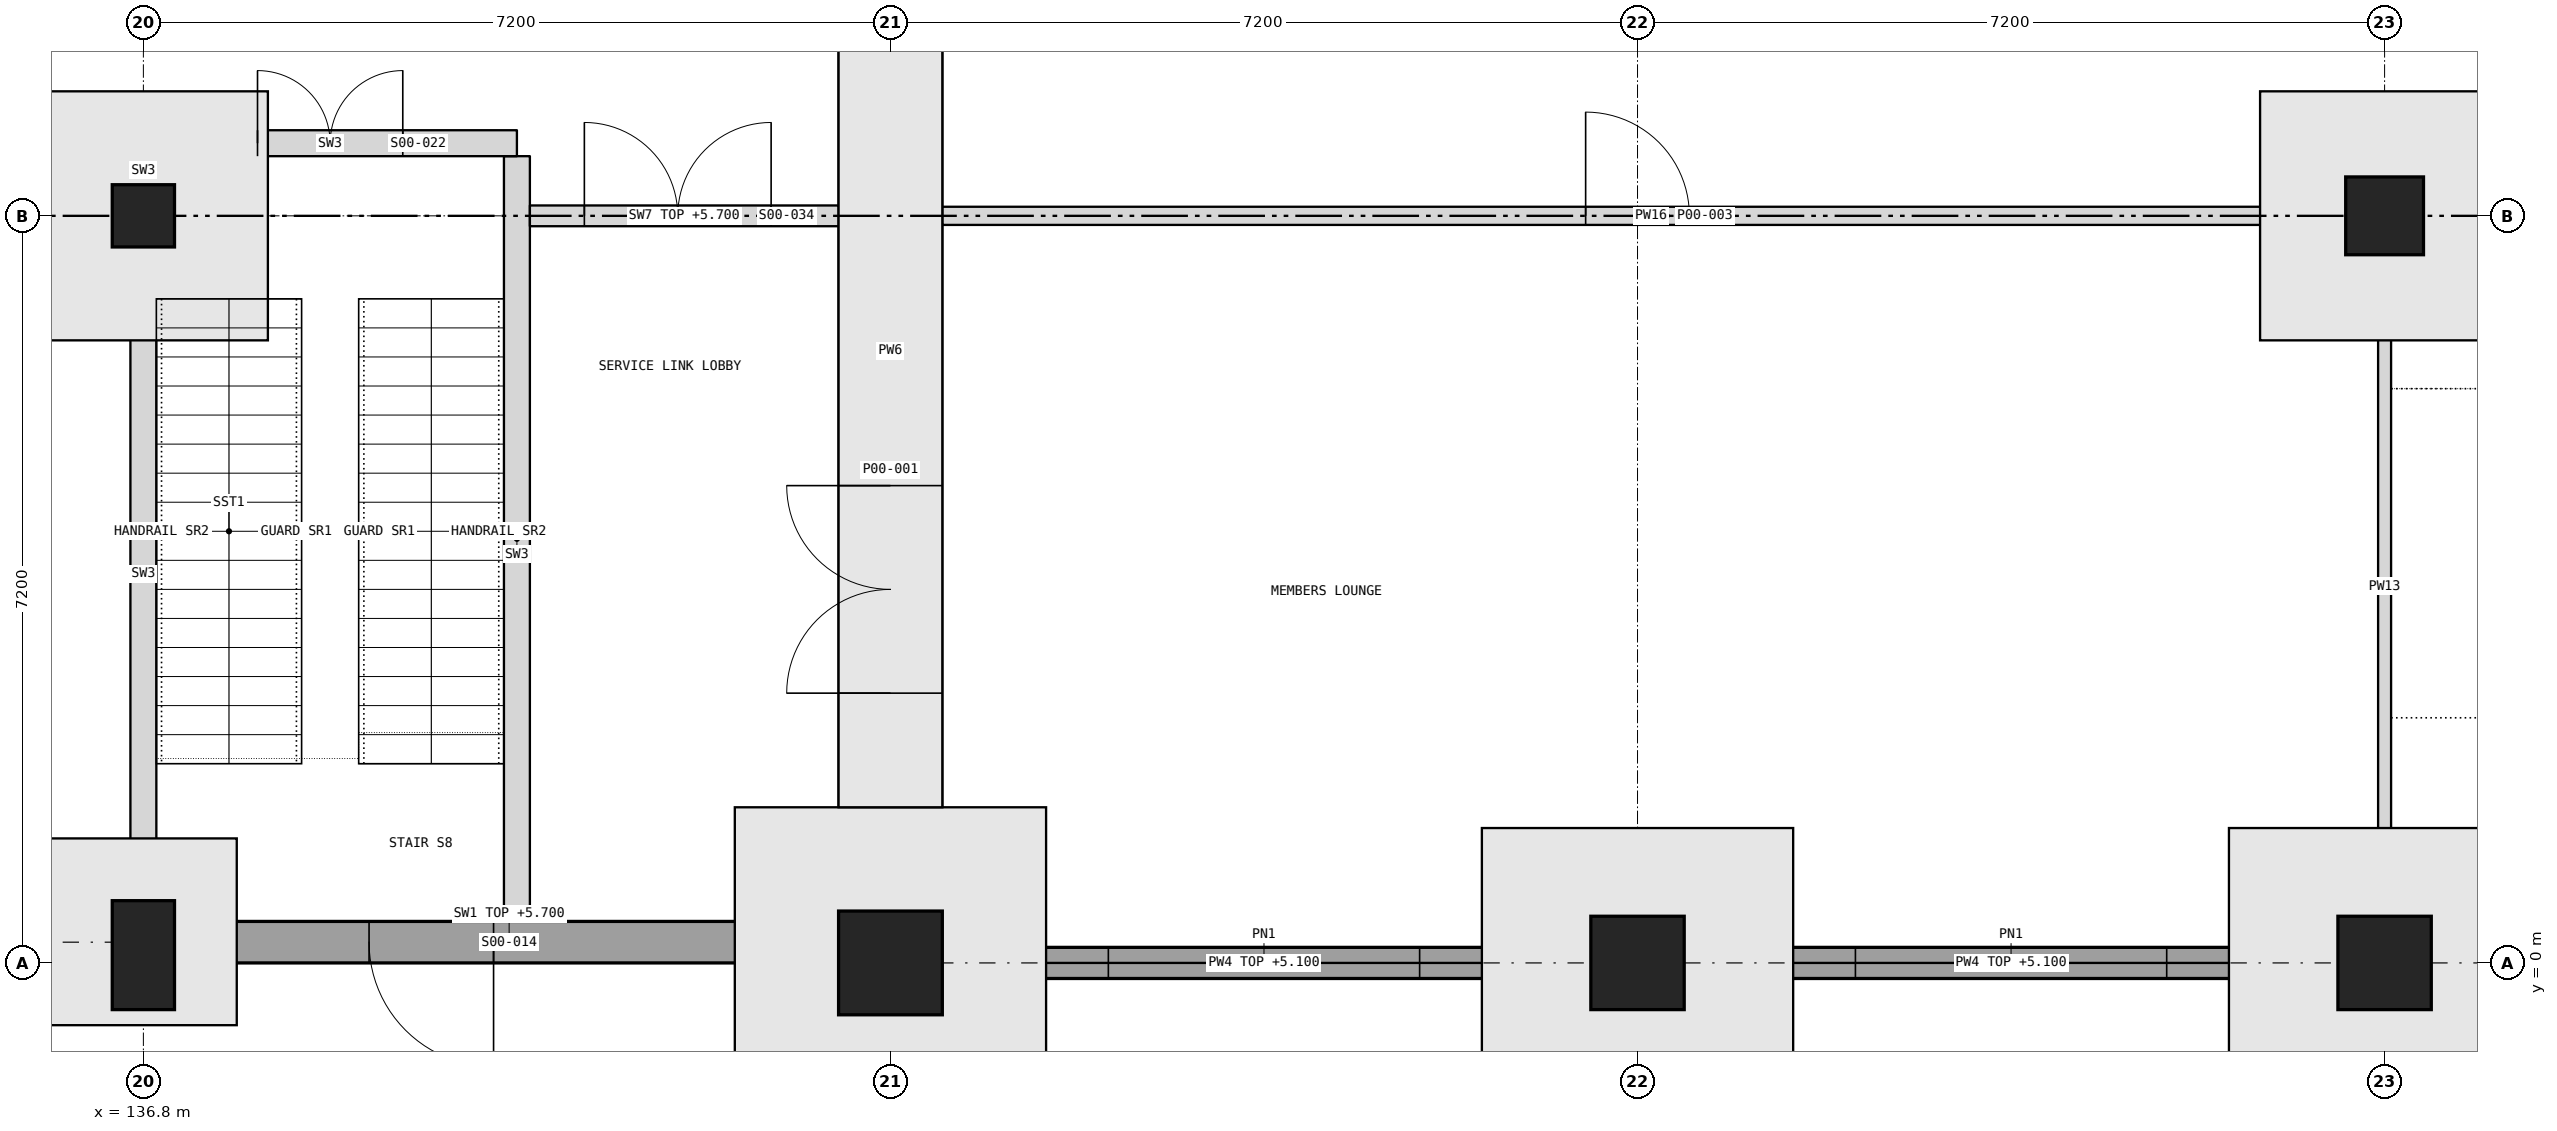
"""IFC4 building model, lengths in metres.
Left out: names, types, materials, properties, quantities, classifications, styles, units other than length and angle.
Written with IfcOpenShell. Run it as: python <this file> out.ifc"""

import sys

from ifc_helpers import new_model, si_unit, direction, frame, frame_2d, origin, origin_2d, place, context, subcontext, project, spatial, rectangle, extrude, element, fill, save


model = new_model("IFC4")
c1 = context("Model", 3, precision=1e-05, world=origin(), true_north=direction((0.0, 1.0)))
c2 = subcontext(c1, "Body", "Model", "MODEL_VIEW")
j1 = project(units=[si_unit("LENGTHUNIT", "METRE"), si_unit("PLANEANGLEUNIT", "RADIAN")], contexts=[c1])
p1 = place(None, origin())
s1 = spatial("IfcSite", under=j1, at=p1, CompositionType="ELEMENT")
p2 = place(p1, origin())
s2 = spatial("IfcBuilding", under=s1, at=p2, CompositionType="ELEMENT")
p3 = place(p2, origin())
s3 = spatial("IfcBuildingStorey", under=s2, at=p3, CompositionType="ELEMENT", Elevation=0.0)
p4 = place(p3, frame((136.8, 0.075, -0.45), z_axis=(0.0, 0.0, 1.0), x_axis=(1.0, 0.0, 0.0)))
e1 = element("IfcColumn", 1, at=p4, inside=s3, PredefinedType="COLUMN", context=c2, shape_type="SweptSolid", body=[
    extrude(rectangle(XDim=0.6, YDim=1.05, at=origin_2d()), origin(), (0.0, 0.0, 1.0), 6.45),
])
p5 = place(p3, frame((136.8, 7.2, -0.405), z_axis=(0.0, 0.0, 1.0), x_axis=(1.0, 0.0, 0.0)))
e2 = element("IfcColumn", 2, at=p5, inside=s3, PredefinedType="COLUMN", context=c2, shape_type="SweptSolid", body=[
    extrude(rectangle(XDim=0.6, YDim=0.6, at=origin_2d()), origin(), (0.0, 0.0, 1.0), 6.405),
])
p6 = place(p3, frame((129.9, 0.2, 0.0), z_axis=(0.0, 0.0, 1.0), x_axis=(1.0, 0.0, 0.0)))
e3 = element("IfcWall", 3, at=p6, inside=s3, PredefinedType="SOLIDWALL", context=c2, shape_type="SweptSolid", body=[
    extrude(rectangle(XDim=6.6, YDim=0.4, at=frame_2d((3.3, 0.0))), origin(), (0.0, 0.0, 1.0), 5.1),
])
p7 = place(p3, frame((137.1, 0.2, 0.0), z_axis=(0.0, 0.0, 1.0), x_axis=(1.0, 0.0, 0.0)))
e4 = element("IfcWall", 4, at=p7, inside=s3, PredefinedType="SOLIDWALL", context=c2, shape_type="SweptSolid", body=[
    extrude(rectangle(XDim=6.45, YDim=0.4, at=frame_2d((3.225, 0.0))), origin(), (0.0, 0.0, 1.0), 5.7),
])
p8 = place(p7, frame((1.875, 0.0, 0.0)))
e5 = element("IfcOpeningElement", 5, at=p8, cuts=e4, PredefinedType="OPENING", context=c2, shape_type="SweptSolid", body=[
    extrude(rectangle(XDim=1.2, YDim=2.1, at=frame_2d((0.6, 1.05))), frame((0.0, 0.21, 0.0), z_axis=(0.0, -1.0, 0.0), x_axis=(1.0, 0.0, 0.0)), (0.0, 0.0, 1.0), 0.42),
])
p9 = place(p3, frame((144.0, 0.0, -0.5), z_axis=(0.0, 0.0, 1.0), x_axis=(1.0, 0.0, 0.0)))
e6 = element("IfcColumn", 6, at=p9, inside=s3, PredefinedType="COLUMN", context=c2, shape_type="SweptSolid", body=[
    extrude(rectangle(XDim=1.0, YDim=1.0, at=origin_2d()), origin(), (0.0, 0.0, 1.0), 6.5),
])
for number, where, z_axis, x_axis in (
    (7, (151.2, 0.0, 0.0), (0.0, 0.0, 1.0), (1.0, 0.0, 0.0)),
    (8, (158.4, 0.0, 0.0), (0.0, 0.0, 1.0), (1.0, 0.0, 0.0)),
):
    element("IfcColumn", number, at=place(p3, frame(where, z_axis=z_axis, x_axis=x_axis)), inside=s3, PredefinedType="COLUMN", context=c2, shape_type="SweptSolid", body=[
        extrude(rectangle(XDim=0.9, YDim=0.9, at=origin_2d()), origin(), (0.0, 0.0, 1.0), 6.0),
    ])
p10 = place(p3, frame((158.4, 7.2, 0.0), z_axis=(0.0, 0.0, 1.0), x_axis=(1.0, 0.0, 0.0)))
e9 = element("IfcColumn", 9, at=p10, inside=s3, PredefinedType="COLUMN", context=c2, shape_type="SweptSolid", body=[
    extrude(rectangle(XDim=0.75, YDim=0.75, at=origin_2d()), origin(), (0.0, 0.0, 1.0), 6.0),
])
p11 = place(p3, frame((144.0, 0.4, 0.0), z_axis=(0.0, 0.0, 1.0), x_axis=(0.0, 1.0, 0.0)))
e10 = element("IfcWall", 10, at=p11, inside=s3, PredefinedType="SOLIDWALL", context=c2, shape_type="SweptSolid", body=[
    extrude(rectangle(XDim=11.0, YDim=1.0, at=frame_2d((5.5, 0.0))), origin(), (0.0, 0.0, 1.0), 5.5),
])
p12 = place(p11, frame((2.2, 0.0, 0.0)))
e11 = element("IfcOpeningElement", 11, at=p12, cuts=e10, PredefinedType="OPENING", context=c2, shape_type="SweptSolid", body=[
    extrude(rectangle(XDim=2.0, YDim=2.1, at=frame_2d((1.0, 1.05))), frame((0.0, 0.51, 0.0), z_axis=(0.0, -1.0, 0.0), x_axis=(1.0, 0.0, 0.0)), (0.0, 0.0, 1.0), 1.02),
])
p13 = place(p3, frame((144.45, 0.0, 0.0), z_axis=(0.0, 0.0, 1.0), x_axis=(1.0, 0.0, 0.0)))
e12 = element("IfcWall", 12, at=p13, inside=s3, PredefinedType="SOLIDWALL", context=c2, shape_type="SweptSolid", body=[
    extrude(rectangle(XDim=6.3, YDim=0.3, at=frame_2d((3.15, 0.0))), origin(), (0.0, 0.0, 1.0), 5.1),
])
p14 = place(p13, frame((1.65, 0.0, 1.2)))
e13 = element("IfcOpeningElement", 13, at=p14, cuts=e12, PredefinedType="OPENING", context=c2, shape_type="SweptSolid", body=[
    extrude(rectangle(XDim=3.0, YDim=2.4, at=frame_2d((1.5, 1.2))), frame((0.0, 0.16, 0.0), z_axis=(0.0, -1.0, 0.0), x_axis=(1.0, 0.0, 0.0)), (0.0, 0.0, 1.0), 0.32),
])
p15 = place(p3, frame((151.65, 0.0, 0.0), z_axis=(0.0, 0.0, 1.0), x_axis=(1.0, 0.0, 0.0)))
e14 = element("IfcWall", 14, at=p15, inside=s3, PredefinedType="SOLIDWALL", context=c2, shape_type="SweptSolid", body=[
    extrude(rectangle(XDim=6.3, YDim=0.3, at=frame_2d((3.15, 0.0))), origin(), (0.0, 0.0, 1.0), 5.1),
])
p16 = place(p15, frame((1.65, 0.0, 1.2)))
e15 = element("IfcOpeningElement", 15, at=p16, cuts=e14, PredefinedType="OPENING", context=c2, shape_type="SweptSolid", body=[
    extrude(rectangle(XDim=3.0, YDim=2.4, at=frame_2d((1.5, 1.2))), frame((0.0, 0.16, 0.0), z_axis=(0.0, -1.0, 0.0), x_axis=(1.0, 0.0, 0.0)), (0.0, 0.0, 1.0), 0.32),
])
p17 = place(p3, frame((158.85, 0.0, 0.0), z_axis=(0.0, 0.0, 1.0), x_axis=(1.0, 0.0, 0.0)))
e16 = element("IfcWall", 16, at=p17, inside=s3, PredefinedType="SOLIDWALL", context=c2, shape_type="SweptSolid", body=[
    extrude(rectangle(XDim=6.3, YDim=0.3, at=frame_2d((3.15, 0.0))), origin(), (0.0, 0.0, 1.0), 5.1),
])
p18 = place(p17, frame((2.25, 0.0, 0.0)))
e17 = element("IfcOpeningElement", 17, at=p18, cuts=e16, PredefinedType="OPENING", context=c2, shape_type="SweptSolid", body=[
    extrude(rectangle(XDim=1.8, YDim=2.1, at=frame_2d((0.9, 1.05))), frame((0.0, 0.16, 0.0), z_axis=(0.0, -1.0, 0.0), x_axis=(1.0, 0.0, 0.0)), (0.0, 0.0, 1.0), 0.32),
])
p19 = place(p3, frame((136.8, 0.6, 0.0), z_axis=(0.0, 0.0, 1.0), x_axis=(0.0, 1.0, 0.0)))
e18 = element("IfcWall", 18, at=p19, inside=s3, PredefinedType="SOLIDWALL", context=c2, shape_type="SweptSolid", body=[
    extrude(rectangle(XDim=6.3, YDim=0.25, at=frame_2d((3.15, 0.0))), origin(), (0.0, 0.0, 1.0), 5.7),
])
p20 = place(p3, frame((136.8, 7.5, 0.0), z_axis=(0.0, 0.0, 1.0), x_axis=(0.0, 1.0, 0.0)))
e19 = element("IfcWall", 19, at=p20, inside=s3, PredefinedType="SOLIDWALL", context=c2, shape_type="SweptSolid", body=[
    extrude(rectangle(XDim=0.275, YDim=0.25, at=frame_2d((0.137, 0.0))), origin(), (0.0, 0.0, 1.0), 5.7),
])
p21 = place(p3, frame((140.4, 0.4, 0.0), z_axis=(0.0, 0.0, 1.0), x_axis=(0.0, 1.0, 0.0)))
e20 = element("IfcWall", 20, at=p21, inside=s3, PredefinedType="SOLIDWALL", context=c2, shape_type="SweptSolid", body=[
    extrude(rectangle(XDim=7.375, YDim=0.25, at=frame_2d((3.688, 0.0))), origin(), (0.0, 0.0, 1.0), 5.7),
])
p22 = place(p3, frame((140.525, 7.2, 0.0), z_axis=(0.0, 0.0, 1.0), x_axis=(1.0, 0.0, 0.0)))
e21 = element("IfcWall", 21, at=p22, inside=s3, PredefinedType="PARTITIONING", context=c2, shape_type="SweptSolid", body=[
    extrude(rectangle(XDim=2.975, YDim=0.2, at=frame_2d((1.488, 0.0))), origin(), (0.0, 0.0, 1.0), 5.7),
])
p23 = place(p22, frame((0.525, 0.0, 0.0)))
e22 = element("IfcOpeningElement", 22, at=p23, cuts=e21, PredefinedType="OPENING", context=c2, shape_type="SweptSolid", body=[
    extrude(rectangle(XDim=1.8, YDim=2.1, at=frame_2d((0.9, 1.05))), frame((0.0, 0.11, 0.0), z_axis=(0.0, -1.0, 0.0), x_axis=(1.0, 0.0, 0.0)), (0.0, 0.0, 1.0), 0.22),
])
p24 = place(p3, frame((129.9, 7.2, 0.0), z_axis=(0.0, 0.0, 1.0), x_axis=(1.0, 0.0, 0.0)))
e23 = element("IfcWall", 23, at=p24, inside=s3, PredefinedType="PARTITIONING", context=c2, shape_type="SweptSolid", body=[
    extrude(rectangle(XDim=6.6, YDim=0.15, at=frame_2d((3.3, 0.0))), origin(), (0.0, 0.0, 1.0), 5.7),
])
p25 = place(p24, frame((1.05, 0.0, 0.0)))
e24 = element("IfcOpeningElement", 24, at=p25, cuts=e23, PredefinedType="OPENING", context=c2, shape_type="SweptSolid", body=[
    extrude(rectangle(XDim=0.9, YDim=2.1, at=frame_2d((0.45, 1.05))), frame((0.0, 0.085, 0.0), z_axis=(0.0, -1.0, 0.0), x_axis=(1.0, 0.0, 0.0)), (0.0, 0.0, 1.0), 0.17),
])
p26 = place(p3, frame((136.8, 7.9, 0.0), z_axis=(0.0, 0.0, 1.0), x_axis=(1.0, 0.0, 0.0)))
e25 = element("IfcWall", 25, at=p26, inside=s3, PredefinedType="SOLIDWALL", context=c2, shape_type="SweptSolid", body=[
    extrude(rectangle(XDim=3.6, YDim=0.25, at=frame_2d((1.8, 0.0))), origin(), (0.0, 0.0, 1.0), 5.7),
])
p27 = place(p26, frame((1.1, 0.0, 0.0)))
e26 = element("IfcOpeningElement", 26, at=p27, cuts=e25, PredefinedType="OPENING", context=c2, shape_type="SweptSolid", body=[
    extrude(rectangle(XDim=1.4, YDim=2.1, at=frame_2d((0.7, 1.05))), frame((0.0, 0.135, 0.0), z_axis=(0.0, -1.0, 0.0), x_axis=(1.0, 0.0, 0.0)), (0.0, 0.0, 1.0), 0.27),
])
p28 = place(p3, frame((158.4, 0.15, 0.0), z_axis=(0.0, 0.0, 1.0), x_axis=(0.0, 1.0, 0.0)))
e27 = element("IfcWall", 27, at=p28, inside=s3, PredefinedType="SOLIDWALL", context=c2, shape_type="SweptSolid", body=[
    extrude(rectangle(XDim=6.963, YDim=0.125, at=frame_2d((3.481, 0.0))), origin(), (0.0, 0.0, 1.0), 5.5),
])
p29 = place(p3, frame((144.5, 7.2, 0.0), z_axis=(0.0, 0.0, 1.0), x_axis=(1.0, 0.0, 0.0)))
e28 = element("IfcWall", 28, at=p29, inside=s3, PredefinedType="PARTITIONING", context=c2, shape_type="SweptSolid", body=[
    extrude(rectangle(XDim=13.962, YDim=0.175, at=frame_2d((6.981, 0.0))), origin(), (0.0, 0.0, 1.0), 5.5),
])
p30 = place(p29, frame((6.2, 0.0, 0.0)))
e29 = element("IfcOpeningElement", 29, at=p30, cuts=e28, PredefinedType="OPENING", context=c2, shape_type="SweptSolid", body=[
    extrude(rectangle(XDim=1.0, YDim=2.1, at=frame_2d((0.5, 1.05))), frame((0.0, 0.097, 0.0), z_axis=(0.0, -1.0, 0.0), x_axis=(1.0, 0.0, 0.0)), (0.0, 0.0, 1.0), 0.195),
])
p31 = place(p3, frame((158.462, 7.2, 0.0), z_axis=(0.0, 0.0, 1.0), x_axis=(1.0, 0.0, 0.0)))
e30 = element("IfcWall", 30, at=p31, inside=s3, PredefinedType="SOLIDWALL", context=c2, shape_type="SweptSolid", body=[
    extrude(rectangle(XDim=7.075, YDim=0.125, at=frame_2d((3.538, 0.0))), origin(), (0.0, 0.0, 1.0), 5.5),
])
p32 = place(p8, frame((1.2, 0.0, 0.0), z_axis=(0.0, 0.0, 1.0), x_axis=(-1.0, 0.0, 0.0)))
e31 = element("IfcDoor", 31, at=p32, inside=s3, OperationType="SINGLE_SWING_LEFT", PredefinedType="DOOR", context=c2, shape_type="SweptSolid", body=[
    extrude(rectangle(XDim=1.2, YDim=2.1, at=frame_2d((0.6, 1.05))), frame((0.0, 0.025, 0.0), z_axis=(0.0, -1.0, 0.0), x_axis=(1.0, 0.0, 0.0)), (0.0, 0.0, 1.0), 0.05),
])
fill(e5, e31)
p33 = place(p12, origin())
e32 = element("IfcDoor", 32, at=p33, inside=s3, OperationType="DOUBLE_DOOR_SINGLE_SWING", PredefinedType="DOOR", context=c2, shape_type="SweptSolid", body=[
    extrude(rectangle(XDim=2.0, YDim=2.1, at=frame_2d((1.0, 1.05))), frame((0.0, 0.025, 0.0), z_axis=(0.0, -1.0, 0.0), x_axis=(1.0, 0.0, 0.0)), (0.0, 0.0, 1.0), 0.05),
])
fill(e11, e32)
p34 = place(p14, origin())
e33 = element("IfcWindow", 33, at=p34, inside=s3, PartitioningType="DOUBLE_PANEL_VERTICAL", PredefinedType="WINDOW", context=c2, shape_type="SweptSolid", body=[
    extrude(rectangle(XDim=3.0, YDim=2.4, at=frame_2d((1.5, 1.2))), frame((0.0, 0.12, 0.0), z_axis=(0.0, -1.0, 0.0), x_axis=(1.0, 0.0, 0.0)), (0.0, 0.0, 1.0), 0.06),
])
fill(e13, e33)
p35 = place(p16, origin())
e34 = element("IfcWindow", 34, at=p35, inside=s3, PartitioningType="DOUBLE_PANEL_VERTICAL", PredefinedType="WINDOW", context=c2, shape_type="SweptSolid", body=[
    extrude(rectangle(XDim=3.0, YDim=2.4, at=frame_2d((1.5, 1.2))), frame((0.0, 0.12, 0.0), z_axis=(0.0, -1.0, 0.0), x_axis=(1.0, 0.0, 0.0)), (0.0, 0.0, 1.0), 0.06),
])
fill(e15, e34)
p36 = place(p27, origin())
e35 = element("IfcDoor", 35, at=p36, inside=s3, OperationType="DOUBLE_DOOR_SINGLE_SWING", PredefinedType="DOOR", context=c2, shape_type="SweptSolid", body=[
    extrude(rectangle(XDim=1.4, YDim=2.1, at=frame_2d((0.7, 1.05))), frame((0.0, 0.025, 0.0), z_axis=(0.0, -1.0, 0.0), x_axis=(1.0, 0.0, 0.0)), (0.0, 0.0, 1.0), 0.05),
])
fill(e26, e35)
p37 = place(p23, origin())
e36 = element("IfcDoor", 36, at=p37, inside=s3, OperationType="DOUBLE_DOOR_SINGLE_SWING", PredefinedType="DOOR", context=c2, shape_type="SweptSolid", body=[
    extrude(rectangle(XDim=1.8, YDim=2.1, at=frame_2d((0.9, 1.05))), frame((0.0, 0.025, 0.0), z_axis=(0.0, -1.0, 0.0), x_axis=(1.0, 0.0, 0.0)), (0.0, 0.0, 1.0), 0.05),
])
fill(e22, e36)
p38 = place(p30, origin())
e37 = element("IfcDoor", 37, at=p38, inside=s3, OperationType="SINGLE_SWING_LEFT", PredefinedType="DOOR", context=c2, shape_type="SweptSolid", body=[
    extrude(rectangle(XDim=1.0, YDim=2.1, at=frame_2d((0.5, 1.05))), frame((0.0, 0.025, 0.0), z_axis=(0.0, -1.0, 0.0), x_axis=(1.0, 0.0, 0.0)), (0.0, 0.0, 1.0), 0.05),
])
fill(e29, e37)
save(model, sys.argv[1])
